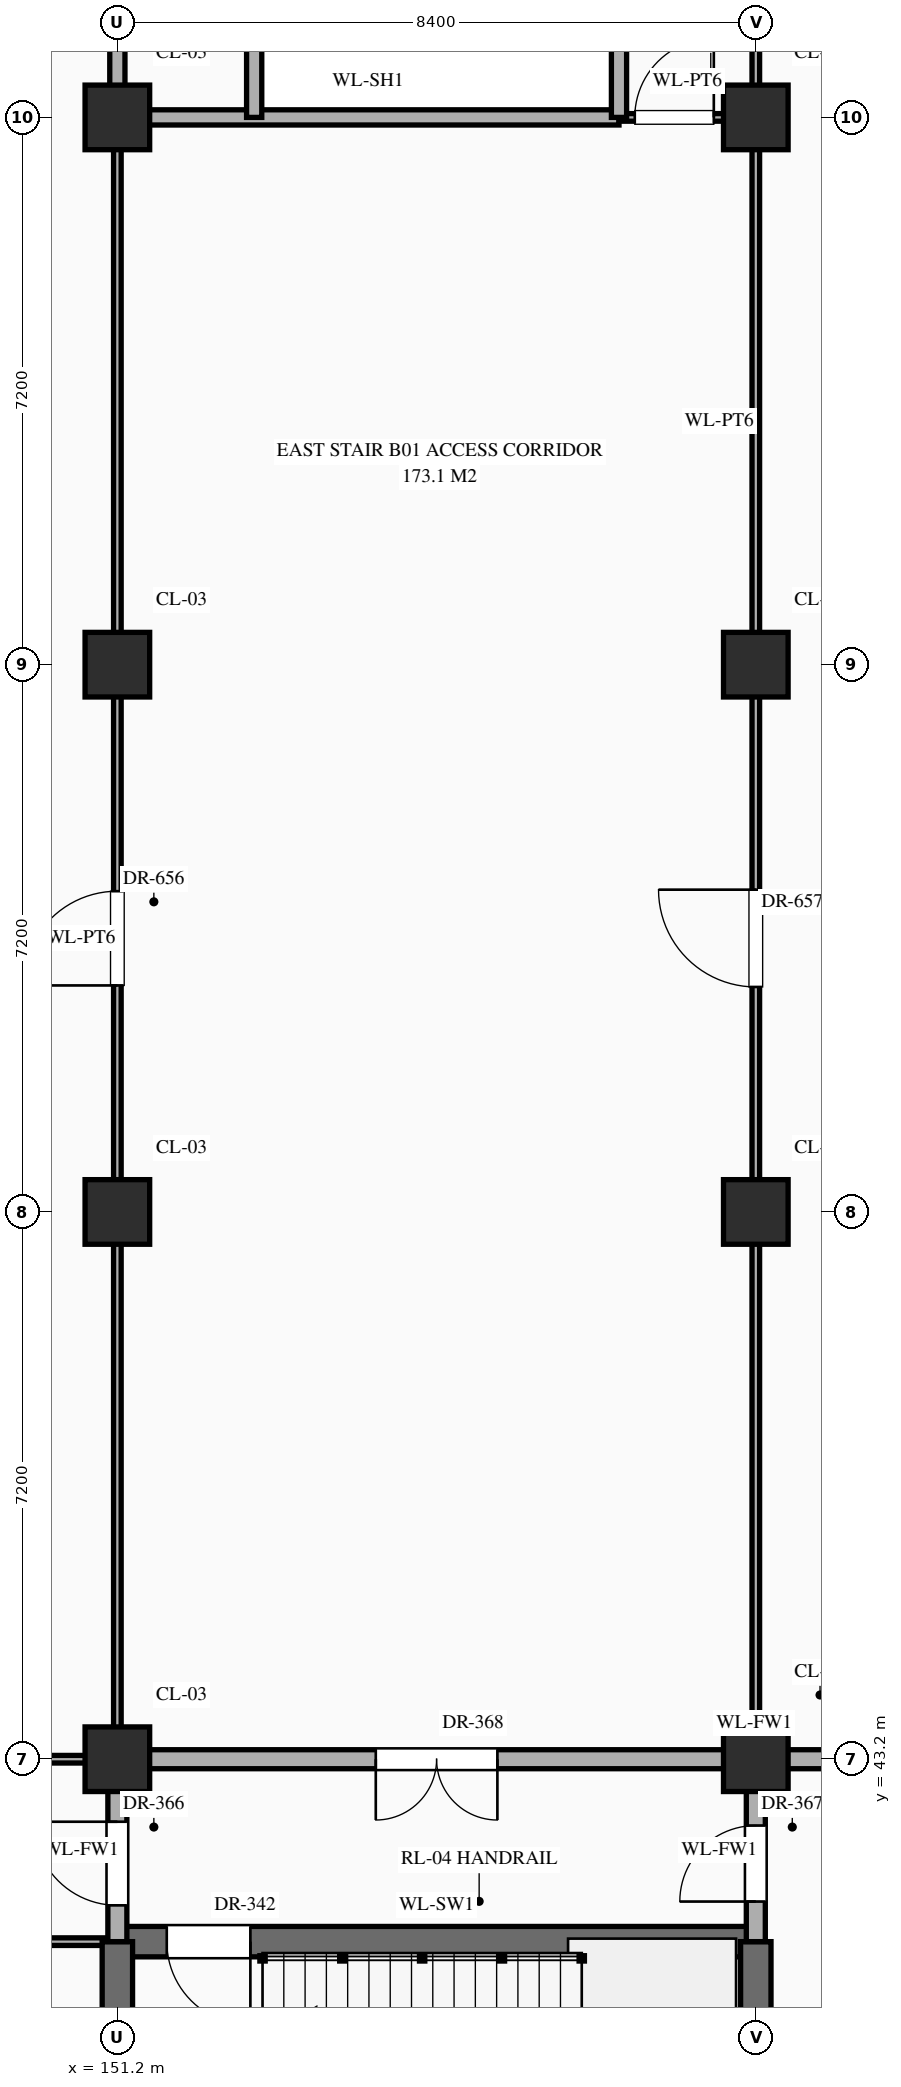
"""IFC4 building model, lengths in metres.
Left out: names, types, materials, properties, quantities, classifications, styles, units other than length and angle.
Written with IfcOpenShell. Run it as: python <this file> out.ifc"""

import sys

from ifc_helpers import new_model, si_unit, direction, frame, frame_2d, origin, origin_2d, place, context, subcontext, project, spatial, rectangle, extrude, element, fill, save


model = new_model("IFC4")
c1 = context("Model", 3, precision=1e-05, world=origin(), true_north=direction((0.0, 1.0)))
c2 = subcontext(c1, "Body", "Model", "MODEL_VIEW")
j1 = project(units=[si_unit("LENGTHUNIT", "METRE"), si_unit("PLANEANGLEUNIT", "RADIAN")], contexts=[c1])
p1 = place(None, origin())
s1 = spatial("IfcSite", under=j1, at=p1, CompositionType="ELEMENT")
p2 = place(p1, origin())
s2 = spatial("IfcBuilding", under=s1, at=p2, CompositionType="ELEMENT")
p3 = place(p2, frame((0.0, 0.0, -5.4)))
s3 = spatial("IfcBuildingStorey", under=s2, at=p3, CompositionType="ELEMENT", Elevation=-5.4)
for number, where, z_axis, x_axis in (
    (1, (151.2, 43.2, 0.0), (0.0, 0.0, 1.0), (1.0, 0.0, 0.0)),
    (2, (151.2, 50.4, 0.0), (0.0, 0.0, 1.0), (1.0, 0.0, 0.0)),
    (3, (151.2, 57.6, 0.0), (0.0, 0.0, 1.0), (1.0, 0.0, 0.0)),
    (4, (151.2, 64.8, 0.0), (0.0, 0.0, 1.0), (1.0, 0.0, 0.0)),
    (5, (159.6, 43.2, 0.0), (0.0, 0.0, 1.0), (1.0, 0.0, 0.0)),
    (6, (159.6, 50.4, 0.0), (0.0, 0.0, 1.0), (1.0, 0.0, 0.0)),
    (7, (159.6, 57.6, 0.0), (0.0, 0.0, 1.0), (1.0, 0.0, 0.0)),
    (8, (159.6, 64.8, 0.0), (0.0, 0.0, 1.0), (1.0, 0.0, 0.0)),
):
    element("IfcColumn", number, at=place(p3, frame(where, z_axis=z_axis, x_axis=x_axis)), inside=s3, PredefinedType="COLUMN", context=c2, shape_type="SweptSolid", body=[
        extrude(rectangle(XDim=0.85, YDim=0.85, at=origin_2d()), origin(), (0.0, 0.0, 1.0), 5.4),
    ])
p4 = place(p3, frame((81.2, 40.8, 0.0), z_axis=(0.0, 0.0, 1.0), x_axis=(1.0, 0.0, 0.0)))
e9 = element("IfcWall", 9, at=p4, inside=s3, PredefinedType="STANDARD", context=c2, shape_type="SweptSolid", body=[
    extrude(rectangle(XDim=70.0, YDim=0.1, at=frame_2d((35.0, 0.0))), origin(), (0.0, 0.0, 1.0), 4.98),
])
p5 = place(p4, frame((34.46, 0.0, 0.0)))
e10 = element("IfcOpeningElement", 10, at=p5, cuts=e9, PredefinedType="OPENING", context=c2, shape_type="SweptSolid", body=[
    extrude(rectangle(XDim=1.08, YDim=2.25, at=frame_2d((0.54, 1.125))), frame((0.0, 0.062, 0.0), z_axis=(0.0, -1.0, 0.0), x_axis=(1.0, 0.0, 0.0)), (0.0, 0.0, 1.0), 0.124),
])
p6 = place(p3, frame((151.2, 40.8, 0.0), z_axis=(0.0, 0.0, 1.0), x_axis=(1.0, 0.0, 0.0)))
e11 = element("IfcWall", 11, at=p6, inside=s3, PredefinedType="SHEAR", context=c2, shape_type="SweptSolid", body=[
    extrude(rectangle(XDim=8.4, YDim=0.4, at=frame_2d((4.2, 0.0))), origin(), (0.0, 0.0, 1.0), 5.1),
])
p7 = place(p6, frame((0.65, 0.0, 0.0)))
e12 = element("IfcOpeningElement", 12, at=p7, cuts=e11, PredefinedType="OPENING", context=c2, shape_type="SweptSolid", body=[
    extrude(rectangle(XDim=1.1, YDim=2.2, at=frame_2d((0.55, 1.1))), frame((0.0, 0.212, 0.0), z_axis=(0.0, -1.0, 0.0), x_axis=(1.0, 0.0, 0.0)), (0.0, 0.0, 1.0), 0.424),
])
p8 = place(p3, frame((81.2, 43.2, 0.0), z_axis=(0.0, 0.0, 1.0), x_axis=(1.0, 0.0, 0.0)))
e13 = element("IfcWall", 13, at=p8, inside=s3, PredefinedType="STANDARD", context=c2, shape_type="SweptSolid", body=[
    extrude(rectangle(XDim=70.0, YDim=0.1, at=frame_2d((35.0, 0.0))), origin(), (0.0, 0.0, 1.0), 4.13),
])
p9 = place(p8, frame((6.44, 0.0, 0.0)))
e14 = element("IfcOpeningElement", 14, at=p9, cuts=e13, PredefinedType="OPENING", context=c2, shape_type="SweptSolid", body=[
    extrude(rectangle(XDim=1.12, YDim=2.25, at=frame_2d((0.56, 1.125))), frame((0.0, 0.062, 0.0), z_axis=(0.0, -1.0, 0.0), x_axis=(1.0, 0.0, 0.0)), (0.0, 0.0, 1.0), 0.124),
])
p10 = place(p3, frame((151.2, 43.2, 0.0), z_axis=(0.0, 0.0, 1.0), x_axis=(1.0, 0.0, 0.0)))
e15 = element("IfcWall", 15, at=p10, inside=s3, PredefinedType="STANDARD", context=c2, shape_type="SweptSolid", body=[
    extrude(rectangle(XDim=16.76, YDim=0.25, at=frame_2d((8.38, 0.0))), origin(), (0.0, 0.0, 1.0), 4.25),
])
p11 = place(p10, frame((3.4, 0.0, 0.0)))
e16 = element("IfcOpeningElement", 16, at=p11, cuts=e15, PredefinedType="OPENING", context=c2, shape_type="SweptSolid", body=[
    extrude(rectangle(XDim=1.6, YDim=2.3, at=frame_2d((0.8, 1.15))), frame((0.0, 0.137, 0.0), z_axis=(0.0, -1.0, 0.0), x_axis=(1.0, 0.0, 0.0)), (0.0, 0.0, 1.0), 0.274),
])
p12 = place(p3, frame((151.2, 64.8, 0.0), z_axis=(0.0, 0.0, 1.0), x_axis=(1.0, 0.0, 0.0)))
e17 = element("IfcWall", 17, at=p12, inside=s3, PredefinedType="STANDARD", context=c2, shape_type="SweptSolid", body=[
    extrude(rectangle(XDim=6.6, YDim=0.2, at=frame_2d((3.3, 0.0))), origin(), (0.0, 0.0, 1.0), 4.25),
])
p13 = place(p3, frame((157.8, 64.8, 0.0), z_axis=(0.0, 0.0, 1.0), x_axis=(1.0, 0.0, 0.0)))
e18 = element("IfcWall", 18, at=p13, inside=s3, PredefinedType="STANDARD", context=c2, shape_type="SweptSolid", body=[
    extrude(rectangle(XDim=1.8, YDim=0.1, at=frame_2d((0.9, 0.0))), origin(), (0.0, 0.0, 1.0), 4.25),
])
p14 = place(p13, frame((0.208, 0.0, 0.0)))
e19 = element("IfcOpeningElement", 19, at=p14, cuts=e18, PredefinedType="OPENING", context=c2, shape_type="SweptSolid", body=[
    extrude(rectangle(XDim=1.04, YDim=2.2, at=frame_2d((0.52, 1.1))), frame((0.0, 0.062, 0.0), z_axis=(0.0, -1.0, 0.0), x_axis=(1.0, 0.0, 0.0)), (0.0, 0.0, 1.0), 0.124),
])
p15 = place(p3, frame((151.2, 36.0, 0.0), z_axis=(0.0, 0.0, 1.0), x_axis=(0.0, 1.0, 0.0)))
e20 = element("IfcWall", 20, at=p15, inside=s3, PredefinedType="SHEAR", context=c2, shape_type="SweptSolid", body=[
    extrude(rectangle(XDim=4.8, YDim=0.4, at=frame_2d((2.4, 0.0))), origin(), (0.0, 0.0, 1.0), 4.98),
])
p16 = place(p3, frame((151.2, 40.8, 0.0), z_axis=(0.0, 0.0, 1.0), x_axis=(0.0, 1.0, 0.0)))
e21 = element("IfcWall", 21, at=p16, inside=s3, PredefinedType="STANDARD", context=c2, shape_type="SweptSolid", body=[
    extrude(rectangle(XDim=2.4, YDim=0.25, at=frame_2d((1.2, 0.0))), origin(), (0.0, 0.0, 1.0), 4.23),
])
p17 = place(p16, frame((0.478, 0.0, 0.0)))
e22 = element("IfcOpeningElement", 22, at=p17, cuts=e21, PredefinedType="OPENING", context=c2, shape_type="SweptSolid", body=[
    extrude(rectangle(XDim=1.1, YDim=2.2, at=frame_2d((0.55, 1.1))), frame((0.0, 0.137, 0.0), z_axis=(0.0, -1.0, 0.0), x_axis=(1.0, 0.0, 0.0)), (0.0, 0.0, 1.0), 0.274),
])
p18 = place(p3, frame((151.2, 43.2, 0.0), z_axis=(0.0, 0.0, 1.0), x_axis=(0.0, 1.0, 0.0)))
e23 = element("IfcWall", 23, at=p18, inside=s3, PredefinedType="STANDARD", context=c2, shape_type="SweptSolid", body=[
    extrude(rectangle(XDim=21.6, YDim=0.1, at=frame_2d((10.8, 0.0))), origin(), (0.0, 0.0, 1.0), 4.23),
])
p19 = place(p18, frame((10.18, 0.0, 0.0)))
e24 = element("IfcOpeningElement", 24, at=p19, cuts=e23, PredefinedType="OPENING", context=c2, shape_type="SweptSolid", body=[
    extrude(rectangle(XDim=1.24, YDim=2.3, at=frame_2d((0.62, 1.15))), frame((0.0, 0.062, 0.0), z_axis=(0.0, -1.0, 0.0), x_axis=(1.0, 0.0, 0.0)), (0.0, 0.0, 1.0), 0.124),
])
p20 = place(p3, frame((151.2, 64.8, 0.0), z_axis=(0.0, 0.0, 1.0), x_axis=(0.0, 1.0, 0.0)))
e25 = element("IfcWall", 25, at=p20, inside=s3, PredefinedType="STANDARD", context=c2, shape_type="SweptSolid", body=[
    extrude(rectangle(XDim=21.6, YDim=0.2, at=frame_2d((10.8, 0.0))), origin(), (0.0, 0.0, 1.0), 4.23),
])
for number, where, z_axis, x_axis in (
    (26, (153.0, 64.8, 0.0), (0.0, 0.0, 1.0), (0.0, 1.0, 0.0)),
    (27, (157.8, 64.8, 0.0), (0.0, 0.0, 1.0), (0.0, 1.0, 0.0)),
):
    element("IfcWall", number, at=place(p3, frame(where, z_axis=z_axis, x_axis=x_axis)), inside=s3, PredefinedType="STANDARD", context=c2, shape_type="SweptSolid", body=[
        extrude(rectangle(XDim=43.2, YDim=0.2, at=frame_2d((21.6, 0.0))), origin(), (0.0, 0.0, 1.0), 5.1),
    ])
p21 = place(p3, frame((159.6, 36.0, 0.0), z_axis=(0.0, 0.0, 1.0), x_axis=(0.0, 1.0, 0.0)))
e28 = element("IfcWall", 28, at=p21, inside=s3, PredefinedType="SHEAR", context=c2, shape_type="SweptSolid", body=[
    extrude(rectangle(XDim=4.8, YDim=0.4, at=frame_2d((2.4, 0.0))), origin(), (0.0, 0.0, 1.0), 5.1),
])
p22 = place(p3, frame((159.6, 40.8, 0.0), z_axis=(0.0, 0.0, 1.0), x_axis=(0.0, 1.0, 0.0)))
e29 = element("IfcWall", 29, at=p22, inside=s3, PredefinedType="STANDARD", context=c2, shape_type="SweptSolid", body=[
    extrude(rectangle(XDim=2.4, YDim=0.25, at=frame_2d((1.2, 0.0))), origin(), (0.0, 0.0, 1.0), 4.35),
])
p23 = place(p22, frame((0.528, 0.0, 0.0)))
e30 = element("IfcOpeningElement", 30, at=p23, cuts=e29, PredefinedType="OPENING", context=c2, shape_type="SweptSolid", body=[
    extrude(rectangle(XDim=1.0, YDim=2.2, at=frame_2d((0.5, 1.1))), frame((0.0, 0.137, 0.0), z_axis=(0.0, -1.0, 0.0), x_axis=(1.0, 0.0, 0.0)), (0.0, 0.0, 1.0), 0.274),
])
p24 = place(p3, frame((159.6, 43.2, 0.0), z_axis=(0.0, 0.0, 1.0), x_axis=(0.0, 1.0, 0.0)))
e31 = element("IfcWall", 31, at=p24, inside=s3, PredefinedType="STANDARD", context=c2, shape_type="SweptSolid", body=[
    extrude(rectangle(XDim=64.8, YDim=0.1, at=frame_2d((32.4, 0.0))), origin(), (0.0, 0.0, 1.0), 4.35),
])
p25 = place(p24, frame((58.462, 0.0, 0.0)))
e32 = element("IfcOpeningElement", 32, at=p25, cuts=e31, PredefinedType="OPENING", context=c2, shape_type="SweptSolid", body=[
    extrude(rectangle(XDim=1.02, YDim=2.4, at=frame_2d((0.51, 1.2))), frame((0.0, 0.062, 0.0), z_axis=(0.0, -1.0, 0.0), x_axis=(1.0, 0.0, 0.0)), (0.0, 0.0, 1.0), 0.124),
])
p26 = place(p24, frame((61.698, 0.0, 0.0)))
e33 = element("IfcOpeningElement", 33, at=p26, cuts=e31, PredefinedType="OPENING", context=c2, shape_type="SweptSolid", body=[
    extrude(rectangle(XDim=1.06, YDim=2.4, at=frame_2d((0.53, 1.2))), frame((0.0, 0.062, 0.0), z_axis=(0.0, -1.0, 0.0), x_axis=(1.0, 0.0, 0.0)), (0.0, 0.0, 1.0), 0.124),
])
p27 = place(p24, frame((51.202, 0.0, 0.0)))
e34 = element("IfcOpeningElement", 34, at=p27, cuts=e31, PredefinedType="OPENING", context=c2, shape_type="SweptSolid", body=[
    extrude(rectangle(XDim=1.14, YDim=2.4, at=frame_2d((0.57, 1.2))), frame((0.0, 0.062, 0.0), z_axis=(0.0, -1.0, 0.0), x_axis=(1.0, 0.0, 0.0)), (0.0, 0.0, 1.0), 0.124),
])
p28 = place(p24, frame((54.577, 0.0, 0.0)))
e35 = element("IfcOpeningElement", 35, at=p28, cuts=e31, PredefinedType="OPENING", context=c2, shape_type="SweptSolid", body=[
    extrude(rectangle(XDim=0.9, YDim=2.15, at=frame_2d((0.45, 1.075))), frame((0.0, 0.062, 0.0), z_axis=(0.0, -1.0, 0.0), x_axis=(1.0, 0.0, 0.0)), (0.0, 0.0, 1.0), 0.124),
])
p29 = place(p24, frame((46.37, 0.0, 0.0)))
e36 = element("IfcOpeningElement", 36, at=p29, cuts=e31, PredefinedType="OPENING", context=c2, shape_type="SweptSolid", body=[
    extrude(rectangle(XDim=0.86, YDim=2.1, at=frame_2d((0.43, 1.05))), frame((0.0, 0.062, 0.0), z_axis=(0.0, -1.0, 0.0), x_axis=(1.0, 0.0, 0.0)), (0.0, 0.0, 1.0), 0.124),
])
p30 = place(p24, frame((41.347, 0.0, 0.0)))
e37 = element("IfcOpeningElement", 37, at=p30, cuts=e31, PredefinedType="OPENING", context=c2, shape_type="SweptSolid", body=[
    extrude(rectangle(XDim=0.96, YDim=2.2, at=frame_2d((0.48, 1.1))), frame((0.0, 0.062, 0.0), z_axis=(0.0, -1.0, 0.0), x_axis=(1.0, 0.0, 0.0)), (0.0, 0.0, 1.0), 0.124),
])
p31 = place(p24, frame((38.073, 0.0, 0.0)))
e38 = element("IfcOpeningElement", 38, at=p31, cuts=e31, PredefinedType="OPENING", context=c2, shape_type="SweptSolid", body=[
    extrude(rectangle(XDim=1.0, YDim=2.25, at=frame_2d((0.5, 1.125))), frame((0.0, 0.062, 0.0), z_axis=(0.0, -1.0, 0.0), x_axis=(1.0, 0.0, 0.0)), (0.0, 0.0, 1.0), 0.124),
])
p32 = place(p24, frame((24.66, 0.0, 0.0)))
e39 = element("IfcOpeningElement", 39, at=p32, cuts=e31, PredefinedType="OPENING", context=c2, shape_type="SweptSolid", body=[
    extrude(rectangle(XDim=1.08, YDim=2.25, at=frame_2d((0.54, 1.125))), frame((0.0, 0.062, 0.0), z_axis=(0.0, -1.0, 0.0), x_axis=(1.0, 0.0, 0.0)), (0.0, 0.0, 1.0), 0.124),
])
p33 = place(p24, frame((10.16, 0.0, 0.0)))
e40 = element("IfcOpeningElement", 40, at=p33, cuts=e31, PredefinedType="OPENING", context=c2, shape_type="SweptSolid", body=[
    extrude(rectangle(XDim=1.28, YDim=2.35, at=frame_2d((0.64, 1.175))), frame((0.0, 0.062, 0.0), z_axis=(0.0, -1.0, 0.0), x_axis=(1.0, 0.0, 0.0)), (0.0, 0.0, 1.0), 0.124),
])
p34 = place(p7, frame((1.1, 0.0, 0.0), z_axis=(0.0, 0.0, 1.0), x_axis=(-1.0, 0.0, 0.0)))
e41 = element("IfcDoor", 41, at=p34, inside=s3, OperationType="SINGLE_SWING_LEFT", PredefinedType="DOOR", context=c2, shape_type="SweptSolid", body=[
    extrude(rectangle(XDim=1.1, YDim=2.2, at=frame_2d((0.55, 1.1))), frame((0.0, 0.025, 0.0), z_axis=(0.0, -1.0, 0.0), x_axis=(1.0, 0.0, 0.0)), (0.0, 0.0, 1.0), 0.05),
])
fill(e12, e41)
p35 = place(p17, origin())
e42 = element("IfcDoor", 42, at=p35, inside=s3, OperationType="SINGLE_SWING_RIGHT", PredefinedType="DOOR", context=c2, shape_type="SweptSolid", body=[
    extrude(rectangle(XDim=1.1, YDim=2.2, at=frame_2d((0.55, 1.1))), frame((0.0, 0.025, 0.0), z_axis=(0.0, -1.0, 0.0), x_axis=(1.0, 0.0, 0.0)), (0.0, 0.0, 1.0), 0.05),
])
fill(e22, e42)
p36 = place(p23, origin())
e43 = element("IfcDoor", 43, at=p36, inside=s3, OperationType="SINGLE_SWING_LEFT", PredefinedType="DOOR", context=c2, shape_type="SweptSolid", body=[
    extrude(rectangle(XDim=1.0, YDim=2.2, at=frame_2d((0.5, 1.1))), frame((0.0, 0.025, 0.0), z_axis=(0.0, -1.0, 0.0), x_axis=(1.0, 0.0, 0.0)), (0.0, 0.0, 1.0), 0.05),
])
fill(e30, e43)
p37 = place(p11, frame((1.6, 0.0, 0.0), z_axis=(0.0, 0.0, 1.0), x_axis=(-1.0, 0.0, 0.0)))
e44 = element("IfcDoor", 44, at=p37, inside=s3, OperationType="DOUBLE_DOOR_SINGLE_SWING", PredefinedType="DOOR", context=c2, shape_type="SweptSolid", body=[
    extrude(rectangle(XDim=1.6, YDim=2.3, at=frame_2d((0.8, 1.15))), frame((0.0, 0.025, 0.0), z_axis=(0.0, -1.0, 0.0), x_axis=(1.0, 0.0, 0.0)), (0.0, 0.0, 1.0), 0.05),
])
fill(e16, e44)
p38 = place(p14, origin())
e45 = element("IfcDoor", 45, at=p38, inside=s3, OperationType="SINGLE_SWING_RIGHT", PredefinedType="DOOR", context=c2, shape_type="SweptSolid", body=[
    extrude(rectangle(XDim=1.04, YDim=2.2, at=frame_2d((0.52, 1.1))), frame((0.0, 0.025, 0.0), z_axis=(0.0, -1.0, 0.0), x_axis=(1.0, 0.0, 0.0)), (0.0, 0.0, 1.0), 0.05),
])
fill(e19, e45)
p39 = place(p19, origin())
e46 = element("IfcDoor", 46, at=p39, inside=s3, OperationType="SINGLE_SWING_LEFT", PredefinedType="DOOR", context=c2, shape_type="SweptSolid", body=[
    extrude(rectangle(XDim=1.24, YDim=2.3, at=frame_2d((0.62, 1.15))), frame((0.0, 0.025, 0.0), z_axis=(0.0, -1.0, 0.0), x_axis=(1.0, 0.0, 0.0)), (0.0, 0.0, 1.0), 0.05),
])
fill(e24, e46)
p40 = place(p33, origin())
e47 = element("IfcDoor", 47, at=p40, inside=s3, OperationType="SINGLE_SWING_RIGHT", PredefinedType="DOOR", context=c2, shape_type="SweptSolid", body=[
    extrude(rectangle(XDim=1.28, YDim=2.35, at=frame_2d((0.64, 1.175))), frame((0.0, 0.025, 0.0), z_axis=(0.0, -1.0, 0.0), x_axis=(1.0, 0.0, 0.0)), (0.0, 0.0, 1.0), 0.05),
])
fill(e40, e47)
save(model, sys.argv[1])
